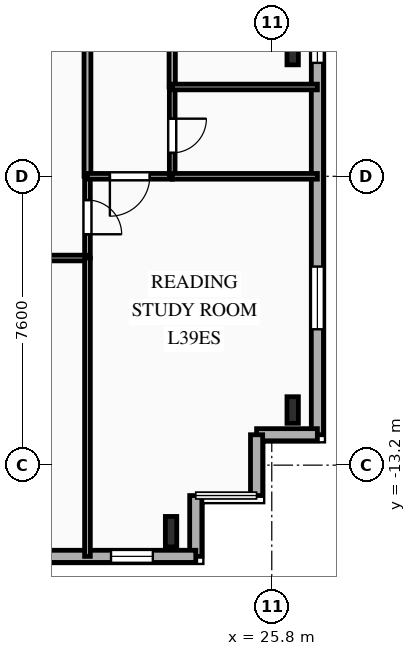
"""IFC4 building model, lengths in metres.
Left out: names, types, materials, properties, quantities, classifications, styles, units other than length and angle.
Written with IfcOpenShell. Run it as: python <this file> out.ifc"""

import sys

from ifc_helpers import new_model, si_unit, direction, frame, frame_2d, origin, origin_2d, place, context, subcontext, project, spatial, rectangle, i_section, extrude, element, fill, save


model = new_model("IFC4")
c1 = context("Model", 3, precision=1e-05, world=origin(), true_north=direction((0.0, 1.0)))
c2 = subcontext(c1, "Body", "Model", "MODEL_VIEW")
j1 = project(units=[si_unit("LENGTHUNIT", "METRE"), si_unit("PLANEANGLEUNIT", "RADIAN")], contexts=[c1])
p1 = place(None, origin())
s1 = spatial("IfcSite", under=j1, at=p1, CompositionType="ELEMENT")
p2 = place(p1, origin())
s2 = spatial("IfcBuilding", under=s1, at=p2, CompositionType="ELEMENT")
p3 = place(p2, frame((0.0, 0.0, 141.05)))
s3 = spatial("IfcBuildingStorey", under=s2, at=p3, CompositionType="ELEMENT", Elevation=141.05)
p4 = place(p3, frame((23.15, -14.95, 0.0), z_axis=(0.0, 0.0, 1.0), x_axis=(1.0, 0.0, 0.0)))
e1 = element("IfcColumn", 1, at=p4, inside=s3, PredefinedType="COLUMN", context=c2, shape_type="SweptSolid", body=[
    extrude(i_section(OverallWidth=0.3, OverallDepth=0.8, WebThickness=0.018, FlangeThickness=0.033, FilletRadius=0.03, at=origin_2d()), origin(), (0.0, 0.0, 1.0), 3.35),
])
for number, where, z_axis, x_axis in (
    (2, (26.35, -11.75, 0.0), (0.0, 0.0, 1.0), (1.0, 0.0, 0.0)),
    (3, (26.35, -2.317, 0.0), (0.0, 0.0, 1.0), (1.0, 0.0, 0.0)),
):
    element("IfcColumn", number, at=place(p3, frame(where, z_axis=z_axis, x_axis=x_axis)), inside=s3, PredefinedType="COLUMN", context=c2, shape_type="SweptSolid", body=[
        extrude(i_section(OverallWidth=0.3, OverallDepth=0.7, WebThickness=0.017, FlangeThickness=0.032, FilletRadius=0.027, at=origin_2d()), origin(), (0.0, 0.0, 1.0), 3.35),
    ])
p5 = place(p3, frame((27.0, 17.2, 0.0), z_axis=(0.0, 0.0, 1.0), x_axis=(0.0, -1.0, 0.0)))
e4 = element("IfcWall", 4, at=p5, inside=s3, PredefinedType="SOLIDWALL", context=c2, shape_type="SweptSolid", body=[
    extrude(rectangle(XDim=29.6, YDim=0.32, at=frame_2d((14.8, 0.0))), origin(), (0.0, 0.0, 1.0), 3.04),
])
p6 = place(p5, frame((3.775, 0.0, 0.85)))
e5 = element("IfcOpeningElement", 5, at=p6, cuts=e4, PredefinedType="OPENING", context=c2, shape_type="SweptSolid", body=[
    extrude(rectangle(XDim=1.65, YDim=1.85, at=frame_2d((0.825, 0.925))), frame((0.0, 0.17, 0.0), z_axis=(0.0, -1.0, 0.0), x_axis=(1.0, 0.0, 0.0)), (0.0, 0.0, 1.0), 0.34),
])
p7 = place(p5, frame((9.32, 0.0, 0.85)))
e6 = element("IfcOpeningElement", 6, at=p7, cuts=e4, PredefinedType="OPENING", context=c2, shape_type="SweptSolid", body=[
    extrude(rectangle(XDim=1.6, YDim=1.85, at=frame_2d((0.8, 0.925))), frame((0.0, 0.17, 0.0), z_axis=(0.0, -1.0, 0.0), x_axis=(1.0, 0.0, 0.0)), (0.0, 0.0, 1.0), 0.34),
])
p8 = place(p5, frame((12.2, 0.0, 0.85)))
e7 = element("IfcOpeningElement", 7, at=p8, cuts=e4, PredefinedType="OPENING", context=c2, shape_type="SweptSolid", body=[
    extrude(rectangle(XDim=1.6, YDim=1.85, at=frame_2d((0.8, 0.925))), frame((0.0, 0.17, 0.0), z_axis=(0.0, -1.0, 0.0), x_axis=(1.0, 0.0, 0.0)), (0.0, 0.0, 1.0), 0.34),
])
p9 = place(p5, frame((15.0, 0.0, 0.85)))
e8 = element("IfcOpeningElement", 8, at=p9, cuts=e4, PredefinedType="OPENING", context=c2, shape_type="SweptSolid", body=[
    extrude(rectangle(XDim=1.6, YDim=1.85, at=frame_2d((0.8, 0.925))), frame((0.0, 0.17, 0.0), z_axis=(0.0, -1.0, 0.0), x_axis=(1.0, 0.0, 0.0)), (0.0, 0.0, 1.0), 0.34),
])
p10 = place(p5, frame((17.865, 0.0, 0.85)))
e9 = element("IfcOpeningElement", 9, at=p10, cuts=e4, PredefinedType="OPENING", context=c2, shape_type="SweptSolid", body=[
    extrude(rectangle(XDim=1.95, YDim=1.85, at=frame_2d((0.975, 0.925))), frame((0.0, 0.17, 0.0), z_axis=(0.0, -1.0, 0.0), x_axis=(1.0, 0.0, 0.0)), (0.0, 0.0, 1.0), 0.34),
])
p11 = place(p5, frame((25.175, 0.0, 0.85)))
e10 = element("IfcOpeningElement", 10, at=p11, cuts=e4, PredefinedType="OPENING", context=c2, shape_type="SweptSolid", body=[
    extrude(rectangle(XDim=1.65, YDim=1.85, at=frame_2d((0.825, 0.925))), frame((0.0, 0.17, 0.0), z_axis=(0.0, -1.0, 0.0), x_axis=(1.0, 0.0, 0.0)), (0.0, 0.0, 1.0), 0.34),
])
for number, where, z_axis, x_axis in (
    (11, (27.0, -12.4, 0.0), (0.0, 0.0, 1.0), (-1.0, 0.0, 0.0)),
    (12, (25.4, -12.4, 0.0), (0.0, 0.0, 1.0), (0.0, -1.0, 0.0)),
    (13, (23.8, -14.0, 0.0), (0.0, 0.0, 1.0), (0.0, -1.0, 0.0)),
):
    element("IfcWall", number, at=place(p3, frame(where, z_axis=z_axis, x_axis=x_axis)), inside=s3, PredefinedType="SOLIDWALL", context=c2, shape_type="SweptSolid", body=[
        extrude(rectangle(XDim=1.6, YDim=0.32, at=frame_2d((0.8, 0.0))), origin(), (0.0, 0.0, 1.0), 3.04),
    ])
p12 = place(p3, frame((23.8, -15.6, 0.0), z_axis=(0.0, 0.0, 1.0), x_axis=(-1.0, 0.0, 0.0)))
e14 = element("IfcWall", 14, at=p12, inside=s3, PredefinedType="SOLIDWALL", context=c2, shape_type="SweptSolid", body=[
    extrude(rectangle(XDim=49.6, YDim=0.32, at=frame_2d((24.8, 0.0))), origin(), (0.0, 0.0, 1.0), 3.04),
])
p13 = place(p12, frame((1.13, 0.0, 0.85)))
e15 = element("IfcOpeningElement", 15, at=p13, cuts=e14, PredefinedType="OPENING", context=c2, shape_type="SweptSolid", body=[
    extrude(rectangle(XDim=1.1, YDim=1.85, at=frame_2d((0.55, 0.925))), frame((0.0, 0.17, 0.0), z_axis=(0.0, -1.0, 0.0), x_axis=(1.0, 0.0, 0.0)), (0.0, 0.0, 1.0), 0.34),
])
p14 = place(p12, frame((6.495, 0.0, 0.85)))
e16 = element("IfcOpeningElement", 16, at=p14, cuts=e14, PredefinedType="OPENING", context=c2, shape_type="SweptSolid", body=[
    extrude(rectangle(XDim=1.65, YDim=1.85, at=frame_2d((0.825, 0.925))), frame((0.0, 0.17, 0.0), z_axis=(0.0, -1.0, 0.0), x_axis=(1.0, 0.0, 0.0)), (0.0, 0.0, 1.0), 0.34),
])
p15 = place(p12, frame((13.996, 0.0, 0.85)))
e17 = element("IfcOpeningElement", 17, at=p15, cuts=e14, PredefinedType="OPENING", context=c2, shape_type="SweptSolid", body=[
    extrude(rectangle(XDim=2.2, YDim=1.85, at=frame_2d((1.1, 0.925))), frame((0.0, 0.17, 0.0), z_axis=(0.0, -1.0, 0.0), x_axis=(1.0, 0.0, 0.0)), (0.0, 0.0, 1.0), 0.34),
])
p16 = place(p12, frame((22.396, 0.0, 0.85)))
e18 = element("IfcOpeningElement", 18, at=p16, cuts=e14, PredefinedType="OPENING", context=c2, shape_type="SweptSolid", body=[
    extrude(rectangle(XDim=2.2, YDim=1.85, at=frame_2d((1.1, 0.925))), frame((0.0, 0.17, 0.0), z_axis=(0.0, -1.0, 0.0), x_axis=(1.0, 0.0, 0.0)), (0.0, 0.0, 1.0), 0.34),
])
p17 = place(p12, frame((30.2, 0.0, 0.85)))
e19 = element("IfcOpeningElement", 19, at=p17, cuts=e14, PredefinedType="OPENING", context=c2, shape_type="SweptSolid", body=[
    extrude(rectangle(XDim=2.2, YDim=1.85, at=frame_2d((1.1, 0.925))), frame((0.0, 0.17, 0.0), z_axis=(0.0, -1.0, 0.0), x_axis=(1.0, 0.0, 0.0)), (0.0, 0.0, 1.0), 0.34),
])
p18 = place(p12, frame((38.673, 0.0, 0.85)))
e20 = element("IfcOpeningElement", 20, at=p18, cuts=e14, PredefinedType="OPENING", context=c2, shape_type="SweptSolid", body=[
    extrude(rectangle(XDim=1.65, YDim=1.85, at=frame_2d((0.825, 0.925))), frame((0.0, 0.17, 0.0), z_axis=(0.0, -1.0, 0.0), x_axis=(1.0, 0.0, 0.0)), (0.0, 0.0, 1.0), 0.34),
])
p19 = place(p12, frame((46.175, 0.0, 0.85)))
e21 = element("IfcOpeningElement", 21, at=p19, cuts=e14, PredefinedType="OPENING", context=c2, shape_type="SweptSolid", body=[
    extrude(rectangle(XDim=1.65, YDim=1.85, at=frame_2d((0.825, 0.925))), frame((0.0, 0.17, 0.0), z_axis=(0.0, -1.0, 0.0), x_axis=(1.0, 0.0, 0.0)), (0.0, 0.0, 1.0), 0.34),
])
p20 = place(p3, frame((20.95, -5.6, 0.0), z_axis=(0.0, 0.0, 1.0), x_axis=(0.0, -1.0, 0.0)))
e22 = element("IfcWall", 22, at=p20, inside=s3, PredefinedType="PARTITIONING", context=c2, shape_type="SweptSolid", body=[
    extrude(rectangle(XDim=2.15, YDim=0.15, at=frame_2d((1.075, 0.0))), origin(), (0.0, 0.0, 1.0), 3.04),
])
p21 = place(p20, frame((0.625, 0.0, 0.0)))
e23 = element("IfcOpeningElement", 23, at=p21, cuts=e22, PredefinedType="OPENING", context=c2, shape_type="SweptSolid", body=[
    extrude(rectangle(XDim=0.9, YDim=2.1, at=frame_2d((0.45, 1.05))), frame((0.0, 0.085, 0.0), z_axis=(0.0, -1.0, 0.0), x_axis=(1.0, 0.0, 0.0)), (0.0, 0.0, 1.0), 0.17),
])
p22 = place(p3, frame((20.95, -7.75, 0.0), z_axis=(0.0, 0.0, 1.0), x_axis=(-1.0, 0.0, 0.0)))
e24 = element("IfcWall", 24, at=p22, inside=s3, PredefinedType="PARTITIONING", context=c2, shape_type="SweptSolid", body=[
    extrude(rectangle(XDim=8.88, YDim=0.15, at=frame_2d((4.44, 0.0))), origin(), (0.0, 0.0, 1.0), 3.04),
])
p23 = place(p22, frame((6.416, 0.0, 0.0)))
e25 = element("IfcOpeningElement", 25, at=p23, cuts=e24, PredefinedType="OPENING", context=c2, shape_type="SweptSolid", body=[
    extrude(rectangle(XDim=1.05, YDim=2.15, at=frame_2d((0.525, 1.075))), frame((0.0, 0.085, 0.0), z_axis=(0.0, -1.0, 0.0), x_axis=(1.0, 0.0, 0.0)), (0.0, 0.0, 1.0), 0.17),
])
p24 = place(p3, frame((20.95, 8.5, 0.0), z_axis=(0.0, 0.0, 1.0), x_axis=(0.0, -1.0, 0.0)))
e26 = element("IfcWall", 26, at=p24, inside=s3, PredefinedType="PARTITIONING", context=c2, shape_type="SweptSolid", body=[
    extrude(rectangle(XDim=14.1, YDim=0.18, at=frame_2d((7.05, 0.0))), origin(), (0.0, 0.0, 1.0), 3.04),
])
p25 = place(p24, frame((8.042, 0.0, 0.0)))
e27 = element("IfcOpeningElement", 27, at=p25, cuts=e26, PredefinedType="OPENING", context=c2, shape_type="SweptSolid", body=[
    extrude(rectangle(XDim=1.0, YDim=2.15, at=frame_2d((0.5, 1.075))), frame((0.0, 0.1, 0.0), z_axis=(0.0, -1.0, 0.0), x_axis=(1.0, 0.0, 0.0)), (0.0, 0.0, 1.0), 0.2),
])
p26 = place(p3, frame((23.18, -5.6, 0.0), z_axis=(0.0, 0.0, 1.0), x_axis=(-1.0, 0.0, 0.0)))
e28 = element("IfcWall", 28, at=p26, inside=s3, PredefinedType="PARTITIONING", context=c2, shape_type="SweptSolid", body=[
    extrude(rectangle(XDim=2.23, YDim=0.15, at=frame_2d((1.115, 0.0))), origin(), (0.0, 0.0, 1.0), 3.04),
])
p27 = place(p26, frame((0.59, 0.0, 0.0)))
e29 = element("IfcOpeningElement", 29, at=p27, cuts=e28, PredefinedType="OPENING", context=c2, shape_type="SweptSolid", body=[
    extrude(rectangle(XDim=1.05, YDim=2.15, at=frame_2d((0.525, 1.075))), frame((0.0, 0.085, 0.0), z_axis=(0.0, -1.0, 0.0), x_axis=(1.0, 0.0, 0.0)), (0.0, 0.0, 1.0), 0.17),
])
p28 = place(p3, frame((23.18, -3.25, 0.0), z_axis=(0.0, 0.0, 1.0), x_axis=(0.0, -1.0, 0.0)))
e30 = element("IfcWall", 30, at=p28, inside=s3, PredefinedType="PLUMBINGWALL", context=c2, shape_type="SweptSolid", body=[
    extrude(rectangle(XDim=2.35, YDim=0.15, at=frame_2d((1.175, 0.0))), origin(), (0.0, 0.0, 1.0), 3.04),
])
p29 = place(p28, frame((0.834, 0.0, 0.0)))
e31 = element("IfcOpeningElement", 31, at=p29, cuts=e30, PredefinedType="OPENING", context=c2, shape_type="SweptSolid", body=[
    extrude(rectangle(XDim=0.9, YDim=2.1, at=frame_2d((0.45, 1.05))), frame((0.0, 0.085, 0.0), z_axis=(0.0, -1.0, 0.0), x_axis=(1.0, 0.0, 0.0)), (0.0, 0.0, 1.0), 0.17),
])
p30 = place(p3, frame((23.18, 0.04, 0.0), z_axis=(0.0, 0.0, 1.0), x_axis=(0.0, -1.0, 0.0)))
e32 = element("IfcWall", 32, at=p30, inside=s3, PredefinedType="PARTITIONING", context=c2, shape_type="SweptSolid", body=[
    extrude(rectangle(XDim=3.29, YDim=0.165, at=frame_2d((1.645, 0.0))), origin(), (0.0, 0.0, 1.0), 3.04),
])
p31 = place(p30, frame((0.702, 0.0, 0.0)))
e33 = element("IfcOpeningElement", 33, at=p31, cuts=e32, PredefinedType="OPENING", context=c2, shape_type="SweptSolid", body=[
    extrude(rectangle(XDim=1.15, YDim=2.15, at=frame_2d((0.575, 1.075))), frame((0.0, 0.093, 0.0), z_axis=(0.0, -1.0, 0.0), x_axis=(1.0, 0.0, 0.0)), (0.0, 0.0, 1.0), 0.185),
])
p32 = place(p3, frame((23.18, -5.6, 0.0), z_axis=(0.0, 0.0, 1.0), x_axis=(1.0, 0.0, 0.0)))
e34 = element("IfcWall", 34, at=p32, inside=s3, PredefinedType="PLUMBINGWALL", context=c2, shape_type="SweptSolid", body=[
    extrude(rectangle(XDim=3.82, YDim=0.15, at=frame_2d((1.91, 0.0))), origin(), (0.0, 0.0, 1.0), 3.04),
])
p33 = place(p3, frame((20.95, -15.6, 0.0), z_axis=(0.0, 0.0, 1.0), x_axis=(0.0, 1.0, 0.0)))
e35 = element("IfcWall", 35, at=p33, inside=s3, PredefinedType="PARTITIONING", context=c2, shape_type="SweptSolid", body=[
    extrude(rectangle(XDim=7.85, YDim=0.15, at=frame_2d((3.925, 0.0))), origin(), (0.0, 0.0, 1.0), 3.04),
])
p34 = place(p3, frame((23.18, -3.25, 0.0), z_axis=(0.0, 0.0, 1.0), x_axis=(1.0, 0.0, 0.0)))
e36 = element("IfcWall", 36, at=p34, inside=s3, PredefinedType="PLUMBINGWALL", context=c2, shape_type="SweptSolid", body=[
    extrude(rectangle(XDim=3.82, YDim=0.15, at=frame_2d((1.91, 0.0))), origin(), (0.0, 0.0, 1.0), 3.04),
])
p35 = place(p10, origin())
e37 = element("IfcWindow", 37, at=p35, inside=s3, PartitioningType="SINGLE_PANEL", PredefinedType="WINDOW", context=c2, shape_type="SweptSolid", body=[
    extrude(rectangle(XDim=1.95, YDim=1.85, at=frame_2d((0.975, 0.925))), frame((0.0, 0.03, 0.0), z_axis=(0.0, -1.0, 0.0), x_axis=(1.0, 0.0, 0.0)), (0.0, 0.0, 1.0), 0.06),
])
fill(e9, e37)
p36 = place(p11, origin())
e38 = element("IfcWindow", 38, at=p36, inside=s3, PartitioningType="SINGLE_PANEL", PredefinedType="WINDOW", context=c2, shape_type="SweptSolid", body=[
    extrude(rectangle(XDim=1.65, YDim=1.85, at=frame_2d((0.825, 0.925))), frame((0.0, 0.03, 0.0), z_axis=(0.0, -1.0, 0.0), x_axis=(1.0, 0.0, 0.0)), (0.0, 0.0, 1.0), 0.06),
])
fill(e10, e38)
p37 = place(p13, origin())
e39 = element("IfcWindow", 39, at=p37, inside=s3, PartitioningType="SINGLE_PANEL", PredefinedType="WINDOW", context=c2, shape_type="SweptSolid", body=[
    extrude(rectangle(XDim=1.1, YDim=1.85, at=frame_2d((0.55, 0.925))), frame((0.0, 0.03, 0.0), z_axis=(0.0, -1.0, 0.0), x_axis=(1.0, 0.0, 0.0)), (0.0, 0.0, 1.0), 0.06),
])
fill(e15, e39)
p38 = place(p21, origin())
e40 = element("IfcDoor", 40, at=p38, inside=s3, OperationType="SINGLE_SWING_RIGHT", PredefinedType="DOOR", context=c2, shape_type="SweptSolid", body=[
    extrude(rectangle(XDim=0.9, YDim=2.1, at=frame_2d((0.45, 1.05))), frame((0.0, 0.025, 0.0), z_axis=(0.0, -1.0, 0.0), x_axis=(1.0, 0.0, 0.0)), (0.0, 0.0, 1.0), 0.05),
])
fill(e23, e40)
p39 = place(p27, origin())
e41 = element("IfcDoor", 41, at=p39, inside=s3, OperationType="SINGLE_SWING_RIGHT", PredefinedType="DOOR", context=c2, shape_type="SweptSolid", body=[
    extrude(rectangle(XDim=1.05, YDim=2.15, at=frame_2d((0.525, 1.075))), frame((0.0, 0.025, 0.0), z_axis=(0.0, -1.0, 0.0), x_axis=(1.0, 0.0, 0.0)), (0.0, 0.0, 1.0), 0.05),
])
fill(e29, e41)
p40 = place(p29, origin())
e42 = element("IfcDoor", 42, at=p40, inside=s3, OperationType="SINGLE_SWING_LEFT", PredefinedType="DOOR", context=c2, shape_type="SweptSolid", body=[
    extrude(rectangle(XDim=0.9, YDim=2.1, at=frame_2d((0.45, 1.05))), frame((0.0, 0.025, 0.0), z_axis=(0.0, -1.0, 0.0), x_axis=(1.0, 0.0, 0.0)), (0.0, 0.0, 1.0), 0.05),
])
fill(e31, e42)
save(model, sys.argv[1])
